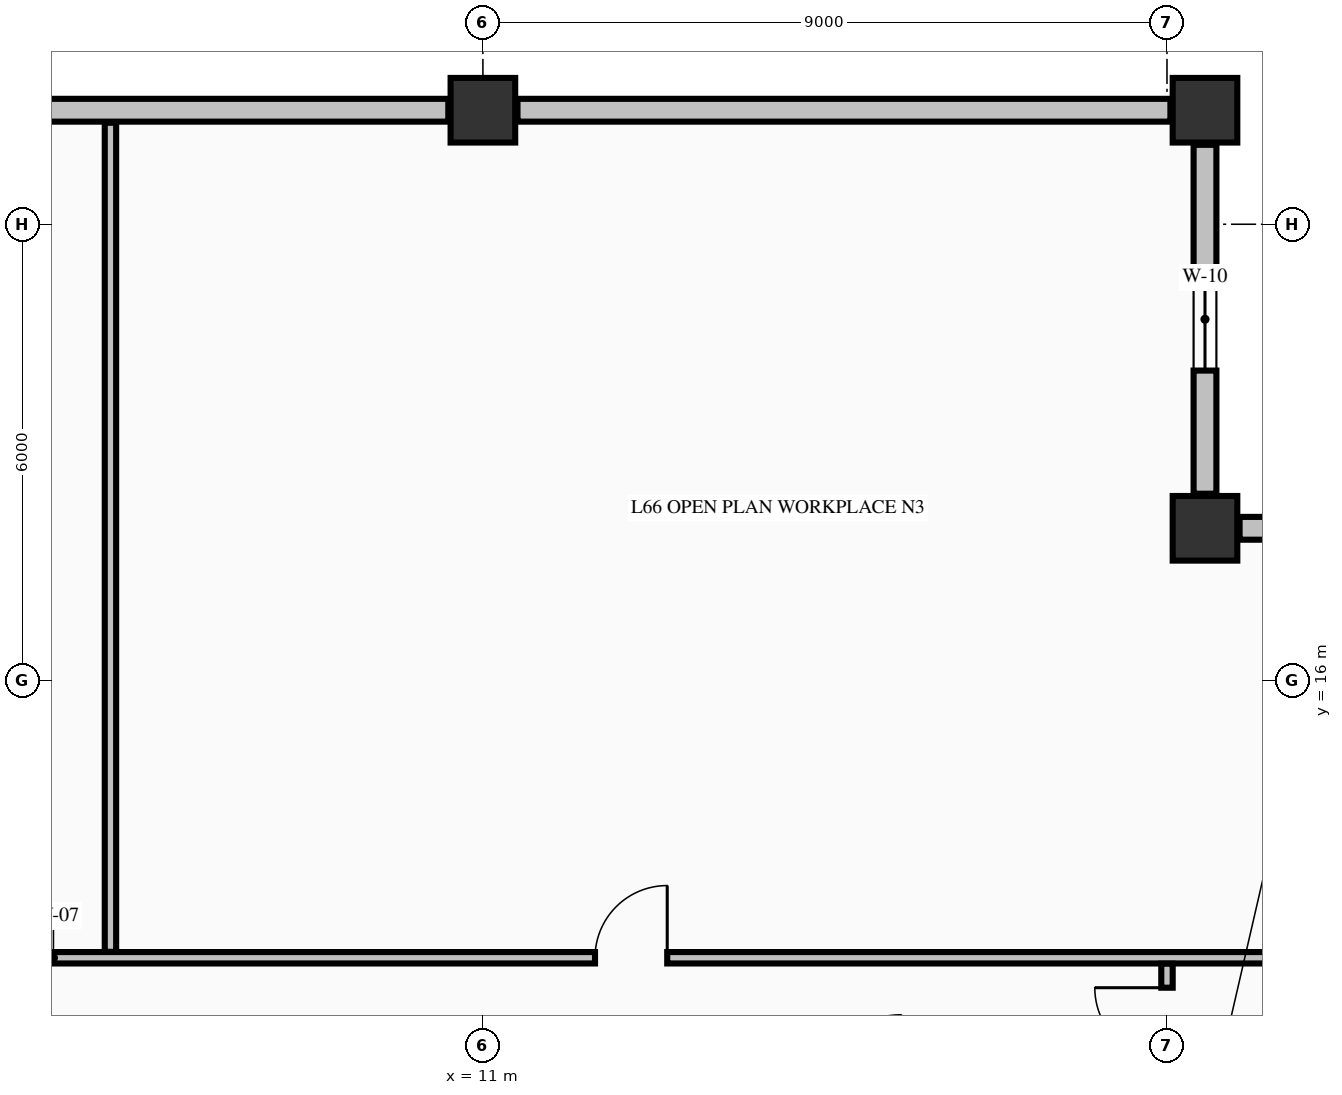
"""IFC4 building model, lengths in metres.
Left out: names, types, materials, properties, quantities, classifications, styles, units other than length and angle.
Written with IfcOpenShell. Run it as: python <this file> out.ifc"""

import sys

from ifc_helpers import new_model, si_unit, direction, frame, frame_2d, origin, origin_2d, place, context, subcontext, project, spatial, rectangle, extrude, element, fill, save


model = new_model("IFC4")
c1 = context("Model", 3, precision=1e-05, world=origin(), true_north=direction((0.0, 1.0)))
c2 = subcontext(c1, "Body", "Model", "MODEL_VIEW")
j1 = project(units=[si_unit("LENGTHUNIT", "METRE"), si_unit("PLANEANGLEUNIT", "RADIAN")], contexts=[c1])
p1 = place(None, origin())
s1 = spatial("IfcSite", under=j1, at=p1, CompositionType="ELEMENT")
p2 = place(p1, origin())
s2 = spatial("IfcBuilding", under=s1, at=p2, CompositionType="ELEMENT")
p3 = place(p2, frame((0.0, 0.0, 249.43)))
s3 = spatial("IfcBuildingStorey", under=s2, at=p3, CompositionType="ELEMENT", Elevation=249.43)
for number, where, z_axis, x_axis in (
    (1, (11.0, 23.5, -0.425), (0.0, 0.0, 1.0), (1.0, 0.0, 0.0)),
    (2, (20.5, 23.5, -0.425), (0.0, 0.0, 1.0), (1.0, 0.0, 0.0)),
    (3, (20.5, 18.0, -0.425), (0.0, 0.0, 1.0), (1.0, 0.0, 0.0)),
):
    element("IfcColumn", number, at=place(p3, frame(where, z_axis=z_axis, x_axis=x_axis)), inside=s3, PredefinedType="COLUMN", context=c2, shape_type="SweptSolid", body=[
        extrude(rectangle(XDim=0.85, YDim=0.85, at=origin_2d()), origin(), (0.0, 0.0, 1.0), 5.0),
    ])
p4 = place(p3, frame((25.545, 18.0, 0.0), z_axis=(0.0, 0.0, 1.0), x_axis=(-1.0, 0.0, 0.0)))
e4 = element("IfcWall", 4, at=p4, inside=s3, PredefinedType="STANDARD", context=c2, shape_type="SweptSolid", body=[
    extrude(rectangle(XDim=4.59, YDim=0.3, at=frame_2d((2.295, 0.0))), origin(), (0.0, 0.0, 1.0), 2.167),
])
p5 = place(p3, frame((20.5, 18.455, 0.0), z_axis=(0.0, 0.0, 1.0), x_axis=(0.0, 1.0, 0.0)))
e5 = element("IfcWall", 5, at=p5, inside=s3, PredefinedType="STANDARD", context=c2, shape_type="SweptSolid", body=[
    extrude(rectangle(XDim=4.59, YDim=0.3, at=frame_2d((2.295, 0.0))), origin(), (0.0, 0.0, 1.0), 2.767),
])
p6 = place(p5, frame((1.62, 0.0, 0.68)))
e6 = element("IfcOpeningElement", 6, at=p6, cuts=e5, PredefinedType="OPENING", context=c2, shape_type="SweptSolid", body=[
    extrude(rectangle(XDim=1.35, YDim=1.42, at=frame_2d((0.675, 0.71))), frame((0.0, 0.16, 0.0), z_axis=(0.0, -1.0, 0.0), x_axis=(1.0, 0.0, 0.0)), (0.0, 0.0, 1.0), 0.32),
])
p7 = place(p3, frame((10.545, 23.5, 0.0), z_axis=(0.0, 0.0, 1.0), x_axis=(-1.0, 0.0, 0.0)))
e7 = element("IfcWall", 7, at=p7, inside=s3, PredefinedType="STANDARD", context=c2, shape_type="SweptSolid", body=[
    extrude(rectangle(XDim=10.09, YDim=0.3, at=frame_2d((5.045, 0.0))), origin(), (0.0, 0.0, 1.0), 2.167),
])
p8 = place(p3, frame((20.045, 23.5, 0.0), z_axis=(0.0, 0.0, 1.0), x_axis=(-1.0, 0.0, 0.0)))
e8 = element("IfcWall", 8, at=p8, inside=s3, PredefinedType="STANDARD", context=c2, shape_type="SweptSolid", body=[
    extrude(rectangle(XDim=8.59, YDim=0.3, at=frame_2d((4.295, 0.0))), origin(), (0.0, 0.0, 1.0), 2.167),
])
p9 = place(p3, frame((-20.075, 12.35, 0.0), z_axis=(0.0, 0.0, 1.0), x_axis=(1.0, 0.0, 0.0)))
e9 = element("IfcWall", 9, at=p9, inside=s3, PredefinedType="PARTITIONING", context=c2, shape_type="SweptSolid", body=[
    extrude(rectangle(XDim=45.91, YDim=0.15, at=frame_2d((22.955, 0.0))), origin(), (0.0, 0.0, 1.0), 2.167),
])
p10 = place(p9, frame((5.75, 0.0, 0.0)))
e10 = element("IfcOpeningElement", 10, at=p10, cuts=e9, PredefinedType="OPENING", context=c2, shape_type="SweptSolid", body=[
    extrude(rectangle(XDim=0.95, YDim=2.02, at=frame_2d((0.475, 1.01))), frame((0.0, 0.085, 0.0), z_axis=(0.0, -1.0, 0.0), x_axis=(1.0, 0.0, 0.0)), (0.0, 0.0, 1.0), 0.17),
])
p11 = place(p9, frame((17.35, 0.0, 0.0)))
e11 = element("IfcOpeningElement", 11, at=p11, cuts=e9, PredefinedType="OPENING", context=c2, shape_type="SweptSolid", body=[
    extrude(rectangle(XDim=0.95, YDim=2.02, at=frame_2d((0.475, 1.01))), frame((0.0, 0.085, 0.0), z_axis=(0.0, -1.0, 0.0), x_axis=(1.0, 0.0, 0.0)), (0.0, 0.0, 1.0), 0.17),
])
p12 = place(p9, frame((32.55, 0.0, 0.0)))
e12 = element("IfcOpeningElement", 12, at=p12, cuts=e9, PredefinedType="OPENING", context=c2, shape_type="SweptSolid", body=[
    extrude(rectangle(XDim=0.95, YDim=2.02, at=frame_2d((0.475, 1.01))), frame((0.0, 0.085, 0.0), z_axis=(0.0, -1.0, 0.0), x_axis=(1.0, 0.0, 0.0)), (0.0, 0.0, 1.0), 0.17),
])
p13 = place(p3, frame((6.1, 12.428, 0.0), z_axis=(0.0, 0.0, 1.0), x_axis=(0.0, 1.0, 0.0)))
e13 = element("IfcWall", 13, at=p13, inside=s3, PredefinedType="PARTITIONING", context=c2, shape_type="SweptSolid", body=[
    extrude(rectangle(XDim=10.907, YDim=0.15, at=frame_2d((5.454, 0.0))), origin(), (0.0, 0.0, 1.0), 4.575),
])
p14 = place(p3, frame((20.0, 10.856, 0.0), z_axis=(0.0, 0.0, 1.0), x_axis=(0.0, 1.0, 0.0)))
e14 = element("IfcWall", 14, at=p14, inside=s3, PredefinedType="PARTITIONING", context=c2, shape_type="SweptSolid", body=[
    extrude(rectangle(XDim=1.416, YDim=0.15, at=frame_2d((0.708, 0.0))), origin(), (0.0, 0.0, 1.0), 4.575),
])
p15 = place(p14, frame((0.15, 0.0, 0.0)))
e15 = element("IfcOpeningElement", 15, at=p15, cuts=e14, PredefinedType="OPENING", context=c2, shape_type="SweptSolid", body=[
    extrude(rectangle(XDim=0.95, YDim=2.02, at=frame_2d((0.475, 1.01))), frame((0.0, 0.085, 0.0), z_axis=(0.0, -1.0, 0.0), x_axis=(1.0, 0.0, 0.0)), (0.0, 0.0, 1.0), 0.17),
])
p16 = place(p6, origin())
e16 = element("IfcWindow", 16, at=p16, inside=s3, PartitioningType="SINGLE_PANEL", PredefinedType="WINDOW", context=c2, shape_type="SweptSolid", body=[
    extrude(rectangle(XDim=1.35, YDim=1.42, at=frame_2d((0.675, 0.71))), frame((0.0, 0.03, 0.0), z_axis=(0.0, -1.0, 0.0), x_axis=(1.0, 0.0, 0.0)), (0.0, 0.0, 1.0), 0.06),
])
fill(e6, e16)
p17 = place(p12, origin())
e17 = element("IfcDoor", 17, at=p17, inside=s3, OperationType="SINGLE_SWING_RIGHT", PredefinedType="DOOR", context=c2, shape_type="SweptSolid", body=[
    extrude(rectangle(XDim=0.95, YDim=2.02, at=frame_2d((0.475, 1.01))), frame((0.0, 0.025, 0.0), z_axis=(0.0, -1.0, 0.0), x_axis=(1.0, 0.0, 0.0)), (0.0, 0.0, 1.0), 0.05),
])
fill(e12, e17)
p18 = place(p15, origin())
e18 = element("IfcDoor", 18, at=p18, inside=s3, OperationType="SINGLE_SWING_RIGHT", PredefinedType="DOOR", context=c2, shape_type="SweptSolid", body=[
    extrude(rectangle(XDim=0.95, YDim=2.02, at=frame_2d((0.475, 1.01))), frame((0.0, 0.025, 0.0), z_axis=(0.0, -1.0, 0.0), x_axis=(1.0, 0.0, 0.0)), (0.0, 0.0, 1.0), 0.05),
])
fill(e15, e18)
save(model, sys.argv[1])
